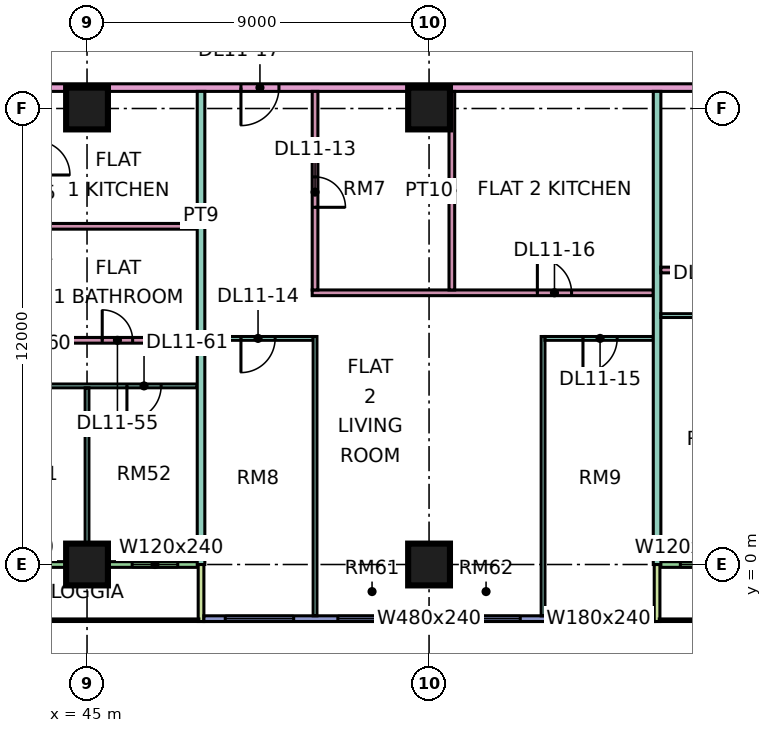
"""IFC4 building model, lengths in metres.
Left out: names, types, materials, properties, quantities, classifications, styles, units other than length and angle.
Written with IfcOpenShell. Run it as: python <this file> out.ifc"""

import sys

from ifc_helpers import new_model, si_unit, direction, frame, frame_2d, origin, origin_2d, place, context, subcontext, project, spatial, rectangle, extrude, element, fill, save


model = new_model("IFC4")
c1 = context("Model", 3, precision=1e-05, world=origin(), true_north=direction((0.0, 1.0)))
c2 = subcontext(c1, "Body", "Model", "MODEL_VIEW")
j1 = project(units=[si_unit("LENGTHUNIT", "METRE"), si_unit("PLANEANGLEUNIT", "RADIAN")], contexts=[c1])
p1 = place(None, origin())
s1 = spatial("IfcSite", under=j1, at=p1, CompositionType="ELEMENT")
p2 = place(p1, origin())
s2 = spatial("IfcBuilding", under=s1, at=p2, CompositionType="ELEMENT")
p3 = place(p2, frame((0.0, 0.0, 56.4)))
s3 = spatial("IfcBuildingStorey", under=s2, at=p3, CompositionType="ELEMENT", Elevation=56.4)
for number, where, z_axis, x_axis in (
    (1, (45.0, 0.0, 0.0), (0.0, 0.0, 1.0), (1.0, 0.0, 0.0)),
    (2, (45.0, 12.0, 0.0), (0.0, 0.0, 1.0), (1.0, 0.0, 0.0)),
    (3, (54.0, 0.0, 0.0), (0.0, 0.0, 1.0), (1.0, 0.0, 0.0)),
    (4, (54.0, 12.0, 0.0), (0.0, 0.0, 1.0), (1.0, 0.0, 0.0)),
):
    element("IfcColumn", number, at=place(p3, frame(where, z_axis=z_axis, x_axis=x_axis)), inside=s3, PredefinedType="COLUMN", context=c2, shape_type="SweptSolid", body=[
        extrude(rectangle(XDim=1.1, YDim=1.1, at=origin_2d()), origin(), (0.0, 0.0, 1.0), 3.75),
    ])
p4 = place(p3, frame((36.075, 0.0, 0.0), z_axis=(0.0, 0.0, 1.0), x_axis=(1.0, 0.0, 0.0)))
e5 = element("IfcWall", 5, at=p4, inside=s3, PredefinedType="SOLIDWALL", context=c2, shape_type="SweptSolid", body=[
    extrude(rectangle(XDim=11.85, YDim=0.15, at=frame_2d((5.925, 0.0))), origin(), (0.0, 0.0, 1.0), 3.35),
])
p5 = place(p4, frame((2.35, 0.0, 0.0)))
e6 = element("IfcOpeningElement", 6, at=p5, cuts=e5, PredefinedType="OPENING", context=c2, shape_type="SweptSolid", body=[
    extrude(rectangle(XDim=1.8, YDim=2.4, at=frame_2d((0.9, 1.2))), frame((0.0, 0.085, 0.0), z_axis=(0.0, -1.0, 0.0), x_axis=(1.0, 0.0, 0.0)), (0.0, 0.0, 1.0), 0.17),
])
p6 = place(p4, frame((6.5, 0.0, 0.45)))
e7 = element("IfcOpeningElement", 7, at=p6, cuts=e5, PredefinedType="OPENING", context=c2, shape_type="SweptSolid", body=[
    extrude(rectangle(XDim=1.2, YDim=2.4, at=frame_2d((0.6, 1.2))), frame((0.0, 0.085, 0.0), z_axis=(0.0, -1.0, 0.0), x_axis=(1.0, 0.0, 0.0)), (0.0, 0.0, 1.0), 0.17),
])
p7 = place(p4, frame((10.113, 0.0, 0.45)))
e8 = element("IfcOpeningElement", 8, at=p7, cuts=e5, PredefinedType="OPENING", context=c2, shape_type="SweptSolid", body=[
    extrude(rectangle(XDim=1.2, YDim=2.4, at=frame_2d((0.6, 1.2))), frame((0.0, 0.085, 0.0), z_axis=(0.0, -1.0, 0.0), x_axis=(1.0, 0.0, 0.0)), (0.0, 0.0, 1.0), 0.17),
])
p8 = place(p3, frame((48.0, -1.5, 0.0), z_axis=(0.0, 0.0, 1.0), x_axis=(0.0, 1.0, 0.0)))
e9 = element("IfcWall", 9, at=p8, inside=s3, PredefinedType="SOLIDWALL", context=c2, shape_type="SweptSolid", body=[
    extrude(rectangle(XDim=1.5, YDim=0.15, at=frame_2d((0.75, 0.0))), origin(), (0.0, 0.0, 1.0), 3.35),
])
p9 = place(p3, frame((48.075, -1.425, 0.0), z_axis=(0.0, 0.0, 1.0), x_axis=(1.0, 0.0, 0.0)))
e10 = element("IfcWall", 10, at=p9, inside=s3, PredefinedType="SOLIDWALL", context=c2, shape_type="SweptSolid", body=[
    extrude(rectangle(XDim=11.85, YDim=0.15, at=frame_2d((5.925, 0.0))), origin(), (0.0, 0.0, 1.0), 3.35),
])
p10 = place(p9, frame((0.562, 0.0, 0.45)))
e11 = element("IfcOpeningElement", 11, at=p10, cuts=e10, PredefinedType="OPENING", context=c2, shape_type="SweptSolid", body=[
    extrude(rectangle(XDim=1.8, YDim=2.4, at=frame_2d((0.9, 1.2))), frame((0.0, 0.085, 0.0), z_axis=(0.0, -1.0, 0.0), x_axis=(1.0, 0.0, 0.0)), (0.0, 0.0, 1.0), 0.17),
])
p11 = place(p9, frame((3.525, 0.0, 0.45)))
e12 = element("IfcOpeningElement", 12, at=p11, cuts=e10, PredefinedType="OPENING", context=c2, shape_type="SweptSolid", body=[
    extrude(rectangle(XDim=4.8, YDim=2.4, at=frame_2d((2.4, 1.2))), frame((0.0, 0.085, 0.0), z_axis=(0.0, -1.0, 0.0), x_axis=(1.0, 0.0, 0.0)), (0.0, 0.0, 1.0), 0.17),
])
p12 = place(p9, frame((9.488, 0.0, 0.45)))
e13 = element("IfcOpeningElement", 13, at=p12, cuts=e10, PredefinedType="OPENING", context=c2, shape_type="SweptSolid", body=[
    extrude(rectangle(XDim=1.8, YDim=2.4, at=frame_2d((0.9, 1.2))), frame((0.0, 0.085, 0.0), z_axis=(0.0, -1.0, 0.0), x_axis=(1.0, 0.0, 0.0)), (0.0, 0.0, 1.0), 0.17),
])
p13 = place(p3, frame((60.075, 0.0, 0.0), z_axis=(0.0, 0.0, 1.0), x_axis=(1.0, 0.0, 0.0)))
e14 = element("IfcWall", 14, at=p13, inside=s3, PredefinedType="SOLIDWALL", context=c2, shape_type="SweptSolid", body=[
    extrude(rectangle(XDim=10.35, YDim=0.15, at=frame_2d((5.175, 0.0))), origin(), (0.0, 0.0, 1.0), 3.35),
])
p14 = place(p13, frame((0.538, 0.0, 0.45)))
e15 = element("IfcOpeningElement", 15, at=p14, cuts=e14, PredefinedType="OPENING", context=c2, shape_type="SweptSolid", body=[
    extrude(rectangle(XDim=1.2, YDim=2.4, at=frame_2d((0.6, 1.2))), frame((0.0, 0.085, 0.0), z_axis=(0.0, -1.0, 0.0), x_axis=(1.0, 0.0, 0.0)), (0.0, 0.0, 1.0), 0.17),
])
p15 = place(p13, frame((5.35, 0.0, 0.0)))
e16 = element("IfcOpeningElement", 16, at=p15, cuts=e14, PredefinedType="OPENING", context=c2, shape_type="SweptSolid", body=[
    extrude(rectangle(XDim=1.8, YDim=2.4, at=frame_2d((0.9, 1.2))), frame((0.0, 0.085, 0.0), z_axis=(0.0, -1.0, 0.0), x_axis=(1.0, 0.0, 0.0)), (0.0, 0.0, 1.0), 0.17),
])
p16 = place(p13, frame((9.188, 0.0, 0.45)))
e17 = element("IfcOpeningElement", 17, at=p16, cuts=e14, PredefinedType="OPENING", context=c2, shape_type="SweptSolid", body=[
    extrude(rectangle(XDim=0.9, YDim=2.4, at=frame_2d((0.45, 1.2))), frame((0.0, 0.085, 0.0), z_axis=(0.0, -1.0, 0.0), x_axis=(1.0, 0.0, 0.0)), (0.0, 0.0, 1.0), 0.17),
])
p17 = place(p3, frame((60.0, -1.5, 0.0), z_axis=(0.0, 0.0, 1.0), x_axis=(0.0, 1.0, 0.0)))
e18 = element("IfcWall", 18, at=p17, inside=s3, PredefinedType="SOLIDWALL", context=c2, shape_type="SweptSolid", body=[
    extrude(rectangle(XDim=1.5, YDim=0.15, at=frame_2d((0.75, 0.0))), origin(), (0.0, 0.0, 1.0), 3.35),
])
p18 = place(p3, frame((33.05, 4.7, 0.0), z_axis=(0.0, 0.0, 1.0), x_axis=(1.0, 0.0, 0.0)))
e19 = element("IfcWall", 19, at=p18, inside=s3, PredefinedType="PARTITIONING", context=c2, shape_type="SweptSolid", body=[
    extrude(rectangle(XDim=14.85, YDim=0.1, at=frame_2d((7.425, 0.0))), origin(), (0.0, 0.0, 1.0), 3.35),
])
p19 = place(p18, frame((10.0, 0.0, 0.0)))
e20 = element("IfcOpeningElement", 20, at=p19, cuts=e19, PredefinedType="OPENING", context=c2, shape_type="SweptSolid", body=[
    extrude(rectangle(XDim=0.9, YDim=2.1, at=frame_2d((0.45, 1.05))), frame((0.0, 0.06, 0.0), z_axis=(0.0, -1.0, 0.0), x_axis=(1.0, 0.0, 0.0)), (0.0, 0.0, 1.0), 0.12),
])
p20 = place(p18, frame((13.0, 0.0, 0.0)))
e21 = element("IfcOpeningElement", 21, at=p20, cuts=e19, PredefinedType="OPENING", context=c2, shape_type="SweptSolid", body=[
    extrude(rectangle(XDim=0.9, YDim=2.1, at=frame_2d((0.45, 1.05))), frame((0.0, 0.06, 0.0), z_axis=(0.0, -1.0, 0.0), x_axis=(1.0, 0.0, 0.0)), (0.0, 0.0, 1.0), 0.12),
])
p21 = place(p18, frame((4.0, 0.0, 0.0)))
e22 = element("IfcOpeningElement", 22, at=p21, cuts=e19, PredefinedType="OPENING", context=c2, shape_type="SweptSolid", body=[
    extrude(rectangle(XDim=0.9, YDim=2.1, at=frame_2d((0.45, 1.05))), frame((0.0, 0.06, 0.0), z_axis=(0.0, -1.0, 0.0), x_axis=(1.0, 0.0, 0.0)), (0.0, 0.0, 1.0), 0.12),
])
p22 = place(p3, frame((40.65, 12.55, 0.0), z_axis=(0.0, 0.0, 1.0), x_axis=(1.0, 0.0, 0.0)))
e23 = element("IfcWall", 23, at=p22, inside=s3, PredefinedType="PARTITIONING", context=c2, shape_type="SweptSolid", body=[
    extrude(rectangle(XDim=31.276, YDim=0.2, at=frame_2d((15.638, 0.0))), origin(), (0.0, 0.0, 1.0), 3.35),
])
p23 = place(p22, frame((8.4, 0.0, 0.0)))
e24 = element("IfcOpeningElement", 24, at=p23, cuts=e23, PredefinedType="OPENING", context=c2, shape_type="SweptSolid", body=[
    extrude(rectangle(XDim=1.0, YDim=2.1, at=frame_2d((0.5, 1.05))), frame((0.0, 0.11, 0.0), z_axis=(0.0, -1.0, 0.0), x_axis=(1.0, 0.0, 0.0)), (0.0, 0.0, 1.0), 0.22),
])
p24 = place(p22, frame((29.7, 0.0, 0.0)))
e25 = element("IfcOpeningElement", 25, at=p24, cuts=e23, PredefinedType="OPENING", context=c2, shape_type="SweptSolid", body=[
    extrude(rectangle(XDim=1.0, YDim=2.1, at=frame_2d((0.5, 1.05))), frame((0.0, 0.11, 0.0), z_axis=(0.0, -1.0, 0.0), x_axis=(1.0, 0.0, 0.0)), (0.0, 0.0, 1.0), 0.22),
])
p25 = place(p22, frame((1.05, 0.0, 0.0)))
e26 = element("IfcOpeningElement", 26, at=p25, cuts=e23, PredefinedType="OPENING", context=c2, shape_type="SweptSolid", body=[
    extrude(rectangle(XDim=1.0, YDim=2.1, at=frame_2d((0.5, 1.05))), frame((0.0, 0.11, 0.0), z_axis=(0.0, -1.0, 0.0), x_axis=(1.0, 0.0, 0.0)), (0.0, 0.0, 1.0), 0.22),
])
p26 = place(p3, frame((43.725, 5.9, 0.0), z_axis=(0.0, 0.0, 1.0), x_axis=(1.0, 0.0, 0.0)))
e27 = element("IfcWall", 27, at=p26, inside=s3, PredefinedType="PARTITIONING", context=c2, shape_type="SweptSolid", body=[
    extrude(rectangle(XDim=4.175, YDim=0.15, at=frame_2d((2.087, 0.0))), origin(), (0.0, 0.0, 1.0), 3.35),
])
p27 = place(p26, frame((1.675, 0.0, 0.0)))
e28 = element("IfcOpeningElement", 28, at=p27, cuts=e27, PredefinedType="OPENING", context=c2, shape_type="SweptSolid", body=[
    extrude(rectangle(XDim=0.8, YDim=2.1, at=frame_2d((0.4, 1.05))), frame((0.0, 0.085, 0.0), z_axis=(0.0, -1.0, 0.0), x_axis=(1.0, 0.0, 0.0)), (0.0, 0.0, 1.0), 0.17),
])
p28 = place(p3, frame((43.725, 8.9, 0.0), z_axis=(0.0, 0.0, 1.0), x_axis=(1.0, 0.0, 0.0)))
e29 = element("IfcWall", 29, at=p28, inside=s3, PredefinedType="PARTITIONING", context=c2, shape_type="SweptSolid", body=[
    extrude(rectangle(XDim=4.175, YDim=0.15, at=frame_2d((2.087, 0.0))), origin(), (0.0, 0.0, 1.0), 3.35),
])
p29 = place(p3, frame((45.0, 0.074, 0.0), z_axis=(0.0, 0.0, 1.0), x_axis=(0.0, 1.0, 0.0)))
e30 = element("IfcWall", 30, at=p29, inside=s3, PredefinedType="PARTITIONING", context=c2, shape_type="SweptSolid", body=[
    extrude(rectangle(XDim=4.576, YDim=0.1, at=frame_2d((2.288, 0.0))), origin(), (0.0, 0.0, 1.0), 3.35),
])
p30 = place(p3, frame((48.0, 0.0, 0.0), z_axis=(0.0, 0.0, 1.0), x_axis=(0.0, 1.0, 0.0)))
e31 = element("IfcWall", 31, at=p30, inside=s3, PredefinedType="PARTITIONING", context=c2, shape_type="SweptSolid", body=[
    extrude(rectangle(XDim=5.975, YDim=0.2, at=frame_2d((2.988, 0.0))), origin(), (0.0, 0.0, 1.0), 3.35),
])
p31 = place(p3, frame((48.0, 5.9, 0.0), z_axis=(0.0, 0.0, 1.0), x_axis=(0.0, 1.0, 0.0)))
e32 = element("IfcWall", 32, at=p31, inside=s3, PredefinedType="PARTITIONING", context=c2, shape_type="SweptSolid", body=[
    extrude(rectangle(XDim=6.55, YDim=0.2, at=frame_2d((3.275, 0.0))), origin(), (0.0, 0.0, 1.0), 3.35),
])
p32 = place(p3, frame((48.1, 5.95, 0.0), z_axis=(0.0, 0.0, 1.0), x_axis=(1.0, 0.0, 0.0)))
e33 = element("IfcWall", 33, at=p32, inside=s3, PredefinedType="PARTITIONING", context=c2, shape_type="SweptSolid", body=[
    extrude(rectangle(XDim=2.85, YDim=0.1, at=frame_2d((1.425, 0.0))), origin(), (0.0, 0.0, 1.0), 3.35),
])
p33 = place(p32, frame((0.95, 0.0, 0.0)))
e34 = element("IfcOpeningElement", 34, at=p33, cuts=e33, PredefinedType="OPENING", context=c2, shape_type="SweptSolid", body=[
    extrude(rectangle(XDim=0.9, YDim=2.1, at=frame_2d((0.45, 1.05))), frame((0.0, 0.06, 0.0), z_axis=(0.0, -1.0, 0.0), x_axis=(1.0, 0.0, 0.0)), (0.0, 0.0, 1.0), 0.12),
])
p34 = place(p3, frame((50.925, 7.15, 0.0), z_axis=(0.0, 0.0, 1.0), x_axis=(1.0, 0.0, 0.0)))
e35 = element("IfcWall", 35, at=p34, inside=s3, PredefinedType="PARTITIONING", context=c2, shape_type="SweptSolid", body=[
    extrude(rectangle(XDim=8.975, YDim=0.15, at=frame_2d((4.487, 0.0))), origin(), (0.0, 0.0, 1.0), 3.35),
])
p35 = place(p34, frame((5.925, 0.0, 0.0)))
e36 = element("IfcOpeningElement", 36, at=p35, cuts=e35, PredefinedType="OPENING", context=c2, shape_type="SweptSolid", body=[
    extrude(rectangle(XDim=0.9, YDim=2.1, at=frame_2d((0.45, 1.05))), frame((0.0, 0.085, 0.0), z_axis=(0.0, -1.0, 0.0), x_axis=(1.0, 0.0, 0.0)), (0.0, 0.0, 1.0), 0.17),
])
p36 = place(p3, frame((51.0, -1.35, 0.0), z_axis=(0.0, 0.0, 1.0), x_axis=(0.0, 1.0, 0.0)))
e37 = element("IfcWall", 37, at=p36, inside=s3, PredefinedType="PARTITIONING", context=c2, shape_type="SweptSolid", body=[
    extrude(rectangle(XDim=7.35, YDim=0.1, at=frame_2d((3.675, 0.0))), origin(), (0.0, 0.0, 1.0), 3.35),
])
p37 = place(p3, frame((51.0, 7.225, 0.0), z_axis=(0.0, 0.0, 1.0), x_axis=(0.0, 1.0, 0.0)))
e38 = element("IfcWall", 38, at=p37, inside=s3, PredefinedType="PARTITIONING", context=c2, shape_type="SweptSolid", body=[
    extrude(rectangle(XDim=5.225, YDim=0.15, at=frame_2d((2.612, 0.0))), origin(), (0.0, 0.0, 1.0), 3.35),
])
p38 = place(p37, frame((2.175, 0.0, 0.0)))
e39 = element("IfcOpeningElement", 39, at=p38, cuts=e38, PredefinedType="OPENING", context=c2, shape_type="SweptSolid", body=[
    extrude(rectangle(XDim=0.8, YDim=2.1, at=frame_2d((0.4, 1.05))), frame((0.0, 0.085, 0.0), z_axis=(0.0, -1.0, 0.0), x_axis=(1.0, 0.0, 0.0)), (0.0, 0.0, 1.0), 0.17),
])
p39 = place(p3, frame((54.6, 7.225, 0.0), z_axis=(0.0, 0.0, 1.0), x_axis=(0.0, 1.0, 0.0)))
e40 = element("IfcWall", 40, at=p39, inside=s3, PredefinedType="PARTITIONING", context=c2, shape_type="SweptSolid", body=[
    extrude(rectangle(XDim=5.225, YDim=0.15, at=frame_2d((2.612, 0.0))), origin(), (0.0, 0.0, 1.0), 3.35),
])
p40 = place(p3, frame((57.0, -1.35, 0.0), z_axis=(0.0, 0.0, 1.0), x_axis=(0.0, 1.0, 0.0)))
e41 = element("IfcWall", 41, at=p40, inside=s3, PredefinedType="PARTITIONING", context=c2, shape_type="SweptSolid", body=[
    extrude(rectangle(XDim=7.35, YDim=0.1, at=frame_2d((3.675, 0.0))), origin(), (0.0, 0.0, 1.0), 3.35),
])
p41 = place(p3, frame((57.05, 5.95, 0.0), z_axis=(0.0, 0.0, 1.0), x_axis=(1.0, 0.0, 0.0)))
e42 = element("IfcWall", 42, at=p41, inside=s3, PredefinedType="PARTITIONING", context=c2, shape_type="SweptSolid", body=[
    extrude(rectangle(XDim=2.85, YDim=0.1, at=frame_2d((1.425, 0.0))), origin(), (0.0, 0.0, 1.0), 3.35),
])
p42 = place(p41, frame((1.0, 0.0, 0.0)))
e43 = element("IfcOpeningElement", 43, at=p42, cuts=e42, PredefinedType="OPENING", context=c2, shape_type="SweptSolid", body=[
    extrude(rectangle(XDim=0.9, YDim=2.1, at=frame_2d((0.45, 1.05))), frame((0.0, 0.06, 0.0), z_axis=(0.0, -1.0, 0.0), x_axis=(1.0, 0.0, 0.0)), (0.0, 0.0, 1.0), 0.12),
])
p43 = place(p3, frame((60.0, 0.0, 0.0), z_axis=(0.0, 0.0, 1.0), x_axis=(0.0, 1.0, 0.0)))
e44 = element("IfcWall", 44, at=p43, inside=s3, PredefinedType="PARTITIONING", context=c2, shape_type="SweptSolid", body=[
    extrude(rectangle(XDim=12.45, YDim=0.2, at=frame_2d((6.225, 0.0))), origin(), (0.0, 0.0, 1.0), 3.35),
])
p44 = place(p3, frame((60.1, 6.55, 0.0), z_axis=(0.0, 0.0, 1.0), x_axis=(1.0, 0.0, 0.0)))
e45 = element("IfcWall", 45, at=p44, inside=s3, PredefinedType="PARTITIONING", context=c2, shape_type="SweptSolid", body=[
    extrude(rectangle(XDim=2.85, YDim=0.1, at=frame_2d((1.425, 0.0))), origin(), (0.0, 0.0, 1.0), 3.35),
])
p45 = place(p44, frame((0.95, 0.0, 0.0)))
e46 = element("IfcOpeningElement", 46, at=p45, cuts=e45, PredefinedType="OPENING", context=c2, shape_type="SweptSolid", body=[
    extrude(rectangle(XDim=0.9, YDim=2.1, at=frame_2d((0.45, 1.05))), frame((0.0, 0.06, 0.0), z_axis=(0.0, -1.0, 0.0), x_axis=(1.0, 0.0, 0.0)), (0.0, 0.0, 1.0), 0.12),
])
p46 = place(p3, frame((60.1, 7.75, 0.0), z_axis=(0.0, 0.0, 1.0), x_axis=(1.0, 0.0, 0.0)))
e47 = element("IfcWall", 47, at=p46, inside=s3, PredefinedType="PARTITIONING", context=c2, shape_type="SweptSolid", body=[
    extrude(rectangle(XDim=9.575, YDim=0.15, at=frame_2d((4.788, 0.0))), origin(), (0.0, 0.0, 1.0), 3.35),
])
p47 = place(p46, frame((7.65, 0.0, 0.0)))
e48 = element("IfcOpeningElement", 48, at=p47, cuts=e47, PredefinedType="OPENING", context=c2, shape_type="SweptSolid", body=[
    extrude(rectangle(XDim=0.8, YDim=2.1, at=frame_2d((0.4, 1.05))), frame((0.0, 0.085, 0.0), z_axis=(0.0, -1.0, 0.0), x_axis=(1.0, 0.0, 0.0)), (0.0, 0.0, 1.0), 0.17),
])
p48 = place(p46, frame((2.75, 0.0, 0.0)))
e49 = element("IfcOpeningElement", 49, at=p48, cuts=e47, PredefinedType="OPENING", context=c2, shape_type="SweptSolid", body=[
    extrude(rectangle(XDim=0.9, YDim=2.1, at=frame_2d((0.45, 1.05))), frame((0.0, 0.085, 0.0), z_axis=(0.0, -1.0, 0.0), x_axis=(1.0, 0.0, 0.0)), (0.0, 0.0, 1.0), 0.17),
])
p49 = place(p7, origin())
e50 = element("IfcWindow", 50, at=p49, inside=s3, PartitioningType="SINGLE_PANEL", PredefinedType="WINDOW", context=c2, shape_type="SweptSolid", body=[
    extrude(rectangle(XDim=1.2, YDim=2.4, at=frame_2d((0.6, 1.2))), frame((0.0, 0.03, 0.0), z_axis=(0.0, -1.0, 0.0), x_axis=(1.0, 0.0, 0.0)), (0.0, 0.0, 1.0), 0.06),
])
fill(e8, e50)
p50 = place(p10, origin())
e51 = element("IfcWindow", 51, at=p50, inside=s3, PartitioningType="SINGLE_PANEL", PredefinedType="WINDOW", context=c2, shape_type="SweptSolid", body=[
    extrude(rectangle(XDim=1.8, YDim=2.4, at=frame_2d((0.9, 1.2))), frame((0.0, 0.03, 0.0), z_axis=(0.0, -1.0, 0.0), x_axis=(1.0, 0.0, 0.0)), (0.0, 0.0, 1.0), 0.06),
])
fill(e11, e51)
p51 = place(p11, origin())
e52 = element("IfcWindow", 52, at=p51, inside=s3, PartitioningType="SINGLE_PANEL", PredefinedType="WINDOW", context=c2, shape_type="SweptSolid", body=[
    extrude(rectangle(XDim=4.8, YDim=2.4, at=frame_2d((2.4, 1.2))), frame((0.0, 0.03, 0.0), z_axis=(0.0, -1.0, 0.0), x_axis=(1.0, 0.0, 0.0)), (0.0, 0.0, 1.0), 0.06),
])
fill(e12, e52)
p52 = place(p12, origin())
e53 = element("IfcWindow", 53, at=p52, inside=s3, PartitioningType="SINGLE_PANEL", PredefinedType="WINDOW", context=c2, shape_type="SweptSolid", body=[
    extrude(rectangle(XDim=1.8, YDim=2.4, at=frame_2d((0.9, 1.2))), frame((0.0, 0.03, 0.0), z_axis=(0.0, -1.0, 0.0), x_axis=(1.0, 0.0, 0.0)), (0.0, 0.0, 1.0), 0.06),
])
fill(e13, e53)
p53 = place(p14, origin())
e54 = element("IfcWindow", 54, at=p53, inside=s3, PartitioningType="SINGLE_PANEL", PredefinedType="WINDOW", context=c2, shape_type="SweptSolid", body=[
    extrude(rectangle(XDim=1.2, YDim=2.4, at=frame_2d((0.6, 1.2))), frame((0.0, 0.03, 0.0), z_axis=(0.0, -1.0, 0.0), x_axis=(1.0, 0.0, 0.0)), (0.0, 0.0, 1.0), 0.06),
])
fill(e15, e54)
p54 = place(p38, frame((0.8, 0.0, 0.0), z_axis=(0.0, 0.0, 1.0), x_axis=(-1.0, 0.0, 0.0)))
e55 = element("IfcDoor", 55, at=p54, inside=s3, OperationType="SINGLE_SWING_LEFT", PredefinedType="DOOR", context=c2, shape_type="SweptSolid", body=[
    extrude(rectangle(XDim=0.8, YDim=2.1, at=frame_2d((0.4, 1.05))), frame((0.0, 0.025, 0.0), z_axis=(0.0, -1.0, 0.0), x_axis=(1.0, 0.0, 0.0)), (0.0, 0.0, 1.0), 0.05),
])
fill(e39, e55)
p55 = place(p33, frame((0.9, 0.0, 0.0), z_axis=(0.0, 0.0, 1.0), x_axis=(-1.0, 0.0, 0.0)))
e56 = element("IfcDoor", 56, at=p55, inside=s3, OperationType="SINGLE_SWING_LEFT", PredefinedType="DOOR", context=c2, shape_type="SweptSolid", body=[
    extrude(rectangle(XDim=0.9, YDim=2.1, at=frame_2d((0.45, 1.05))), frame((0.0, 0.025, 0.0), z_axis=(0.0, -1.0, 0.0), x_axis=(1.0, 0.0, 0.0)), (0.0, 0.0, 1.0), 0.05),
])
fill(e34, e56)
p56 = place(p42, frame((0.9, 0.0, 0.0), z_axis=(0.0, 0.0, 1.0), x_axis=(-1.0, 0.0, 0.0)))
e57 = element("IfcDoor", 57, at=p56, inside=s3, OperationType="SINGLE_SWING_LEFT", PredefinedType="DOOR", context=c2, shape_type="SweptSolid", body=[
    extrude(rectangle(XDim=0.9, YDim=2.1, at=frame_2d((0.45, 1.05))), frame((0.0, 0.025, 0.0), z_axis=(0.0, -1.0, 0.0), x_axis=(1.0, 0.0, 0.0)), (0.0, 0.0, 1.0), 0.05),
])
fill(e43, e57)
p57 = place(p35, origin())
e58 = element("IfcDoor", 58, at=p57, inside=s3, OperationType="SINGLE_SWING_LEFT", PredefinedType="DOOR", context=c2, shape_type="SweptSolid", body=[
    extrude(rectangle(XDim=0.9, YDim=2.1, at=frame_2d((0.45, 1.05))), frame((0.0, 0.025, 0.0), z_axis=(0.0, -1.0, 0.0), x_axis=(1.0, 0.0, 0.0)), (0.0, 0.0, 1.0), 0.05),
])
fill(e36, e58)
p58 = place(p23, frame((1.0, 0.0, 0.0), z_axis=(0.0, 0.0, 1.0), x_axis=(-1.0, 0.0, 0.0)))
e59 = element("IfcDoor", 59, at=p58, inside=s3, OperationType="SINGLE_SWING_LEFT", PredefinedType="DOOR", context=c2, shape_type="SweptSolid", body=[
    extrude(rectangle(XDim=1.0, YDim=2.1, at=frame_2d((0.5, 1.05))), frame((0.0, 0.025, 0.0), z_axis=(0.0, -1.0, 0.0), x_axis=(1.0, 0.0, 0.0)), (0.0, 0.0, 1.0), 0.05),
])
fill(e24, e59)
p59 = place(p27, origin())
e60 = element("IfcDoor", 60, at=p59, inside=s3, OperationType="SINGLE_SWING_LEFT", PredefinedType="DOOR", context=c2, shape_type="SweptSolid", body=[
    extrude(rectangle(XDim=0.8, YDim=2.1, at=frame_2d((0.4, 1.05))), frame((0.0, 0.025, 0.0), z_axis=(0.0, -1.0, 0.0), x_axis=(1.0, 0.0, 0.0)), (0.0, 0.0, 1.0), 0.05),
])
fill(e28, e60)
p60 = place(p20, frame((0.9, 0.0, 0.0), z_axis=(0.0, 0.0, 1.0), x_axis=(-1.0, 0.0, 0.0)))
e61 = element("IfcDoor", 61, at=p60, inside=s3, OperationType="SINGLE_SWING_LEFT", PredefinedType="DOOR", context=c2, shape_type="SweptSolid", body=[
    extrude(rectangle(XDim=0.9, YDim=2.1, at=frame_2d((0.45, 1.05))), frame((0.0, 0.025, 0.0), z_axis=(0.0, -1.0, 0.0), x_axis=(1.0, 0.0, 0.0)), (0.0, 0.0, 1.0), 0.05),
])
fill(e21, e61)
save(model, sys.argv[1])
